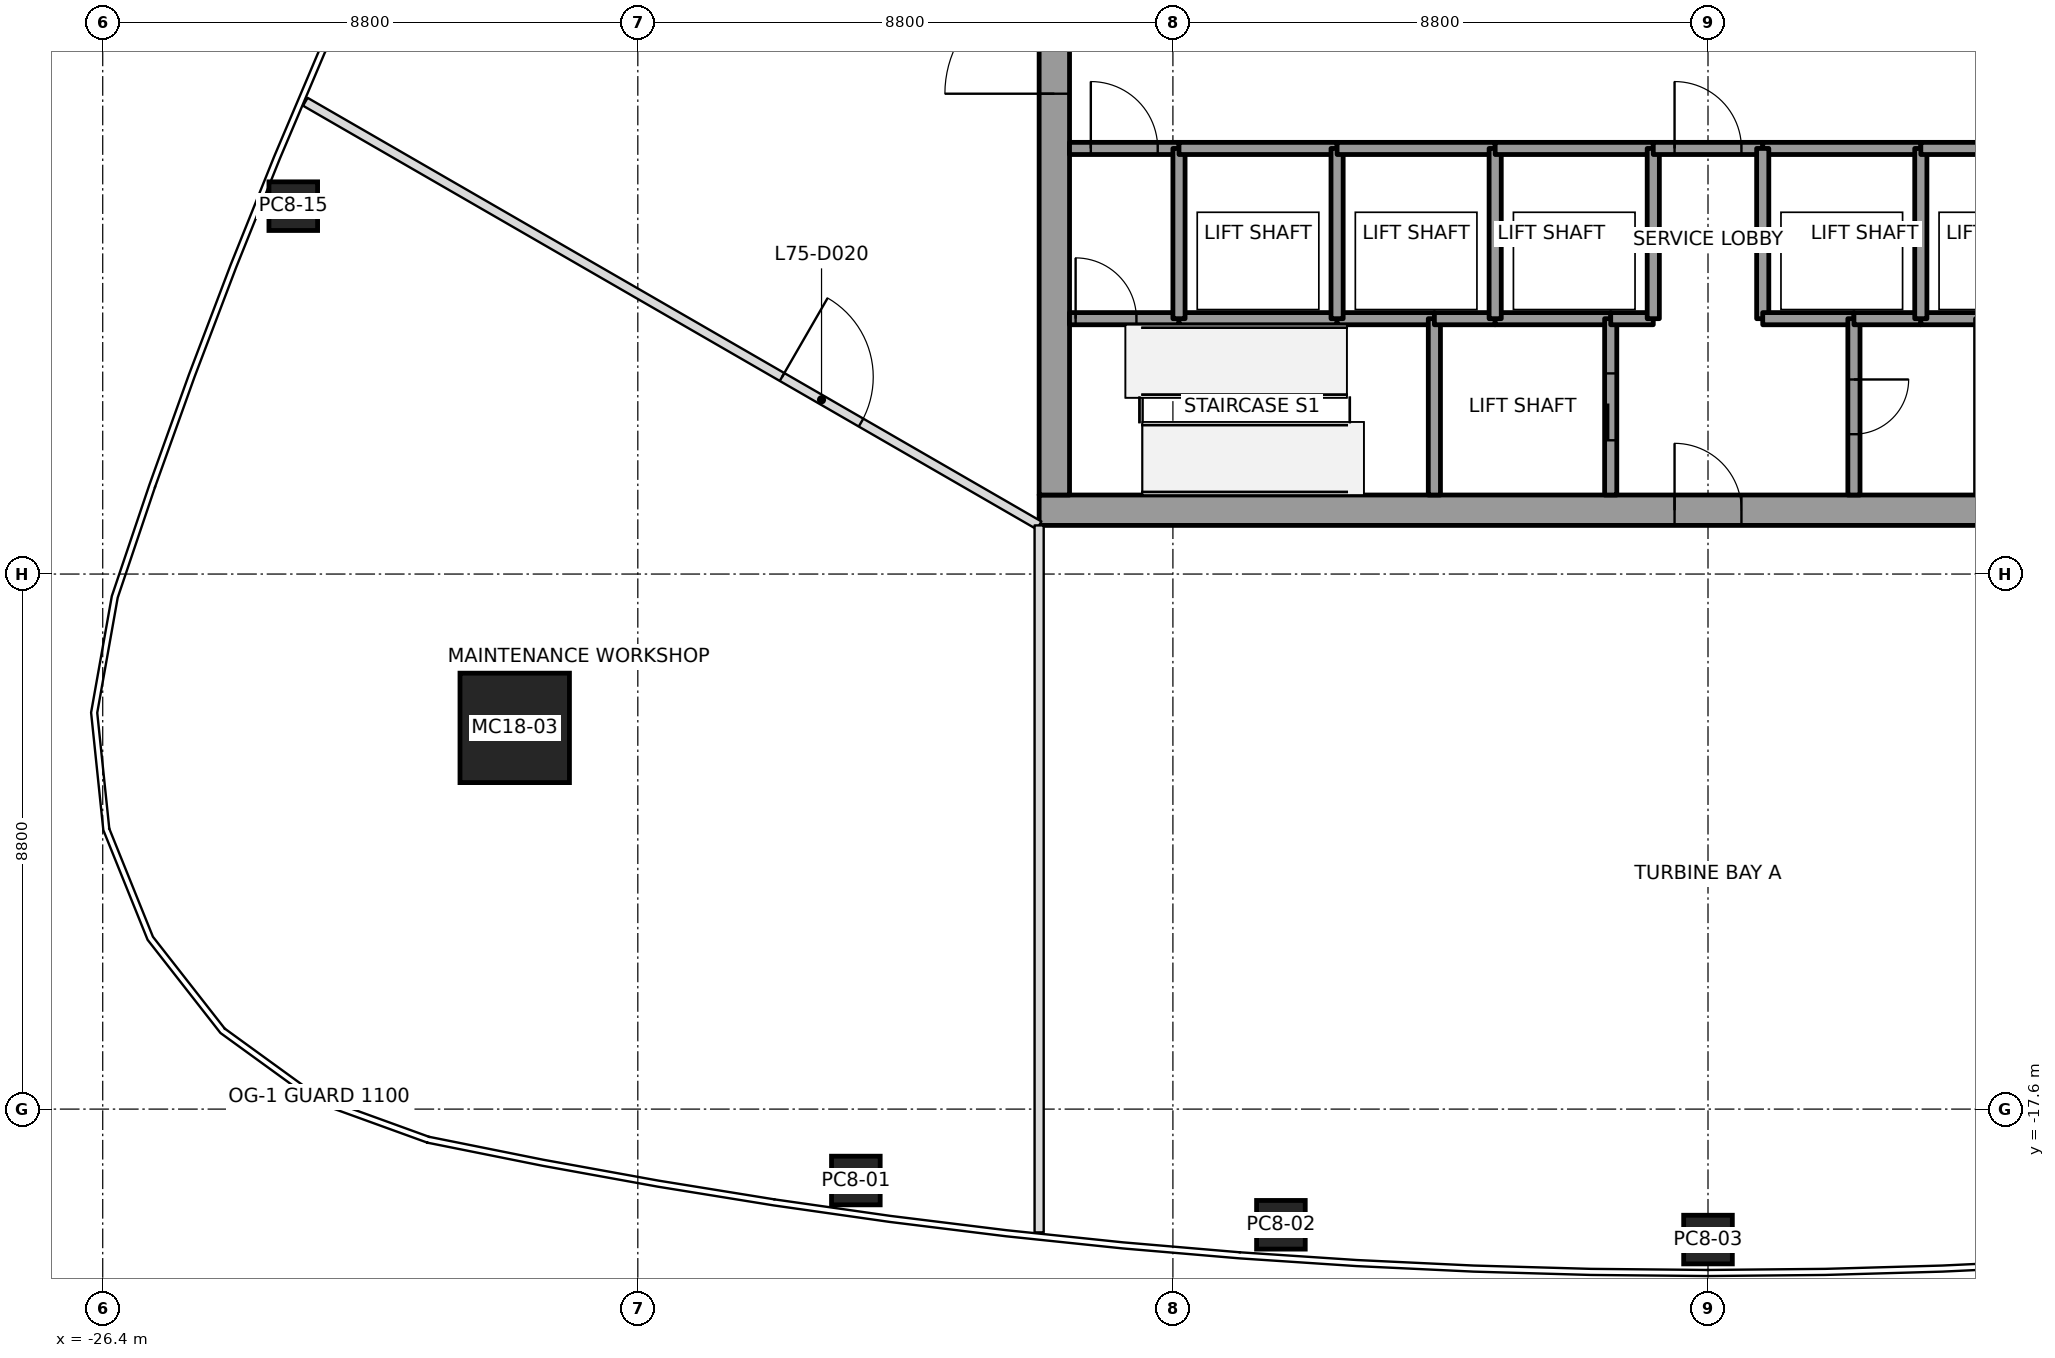
"""IFC4 building model, lengths in metres.
Left out: names, types, materials, properties, quantities, classifications, styles, units other than length and angle.
Written with IfcOpenShell. Run it as: python <this file> out.ifc"""

import sys

from ifc_helpers import new_model, si_unit, direction, frame, frame_2d, origin, origin_2d, place, context, subcontext, project, spatial, rectangle, extrude, clip, halfspace, element, fill, save


model = new_model("IFC4")
c1 = context("Model", 3, precision=1e-05, world=origin(), true_north=direction((0.0, 1.0)))
c2 = subcontext(c1, "Body", "Model", "MODEL_VIEW")
j1 = project(units=[si_unit("LENGTHUNIT", "METRE"), si_unit("PLANEANGLEUNIT", "RADIAN")], contexts=[c1])
p1 = place(None, origin())
s1 = spatial("IfcSite", under=j1, at=p1, CompositionType="ELEMENT")
p2 = place(p1, origin())
s2 = spatial("IfcBuilding", under=s1, at=p2, CompositionType="ELEMENT")
p3 = place(p2, frame((0.0, 0.0, 330.4)))
s3 = spatial("IfcBuildingStorey", under=s2, at=p3, CompositionType="ELEMENT", Elevation=330.4)
p4 = place(p3, frame((-19.625, -11.33, 0.0), z_axis=(0.012314295745, 0.007079363853, 0.999899115275), x_axis=(0.999924176186, -8.7183991e-05, -0.012313987114)))
e1 = element("IfcColumn", 1, at=p4, inside=s3, PredefinedType="COLUMN", context=c2, shape_type="SweptSolid", body=[
    clip(clip(extrude(rectangle(XDim=1.8, YDim=1.8, at=origin_2d()), origin(), (0.0, 0.0, 1.0), 9.001), halfspace(frame((0.0, 0.0, 0.005)), True)), halfspace(frame((0.0, 0.0, 8.992)), False)),
])
p5 = place(p3, frame((-14.014, -18.774, 0.0), z_axis=(0.007730807523, 0.004584233233, 0.999959608895), x_axis=(-0.990410412732, 0.137977794171, 0.007024433605)))
e2 = element("IfcColumn", 2, at=p5, inside=s3, PredefinedType="COLUMN", context=c2, shape_type="SweptSolid", body=[
    clip(clip(extrude(rectangle(XDim=0.8, YDim=0.8, at=origin_2d()), origin(), (0.0, 0.0, 1.0), 9.0), halfspace(frame((0.0, 0.0, 0.002)), True)), halfspace(frame((0.0, 0.0, 8.998)), False)),
])
p6 = place(p3, frame((-7.024, -19.503, 0.0), z_axis=(0.003879046283, 0.004964094195, 0.999980155187), x_axis=(-0.997599573797, 0.069156735942, 0.00352650435)))
e3 = element("IfcColumn", 3, at=p6, inside=s3, PredefinedType="COLUMN", context=c2, shape_type="SweptSolid", body=[
    clip(clip(extrude(rectangle(XDim=0.8, YDim=0.8, at=origin_2d()), origin(), (0.0, 0.0, 1.0), 9.0), halfspace(frame((0.0, 0.0, 0.001)), True)), halfspace(frame((0.0, 0.0, 8.998)), False)),
])
p7 = place(p3, frame((0.0, -19.746, 0.0), z_axis=(0.0, 0.005072634388, 0.999987134107), x_axis=(1.0, 0.0, 0.0)))
e4 = element("IfcColumn", 4, at=p7, inside=s3, PredefinedType="COLUMN", context=c2, shape_type="SweptSolid", body=[
    clip(clip(extrude(rectangle(XDim=0.8, YDim=0.8, at=origin_2d()), origin(), (0.0, 0.0, 1.0), 9.0), halfspace(frame((0.0, 0.0, 0.001)), True)), halfspace(frame((0.0, 0.0, 8.999)), False)),
])
p8 = place(p3, frame((-23.266, -2.75, 0.0), z_axis=(0.00786643411, 0.004394352848, 0.999959403615), x_axis=(0.375745247871, 0.926696342835, -0.007028291271)))
e5 = element("IfcColumn", 5, at=p8, inside=s3, PredefinedType="COLUMN", context=c2, shape_type="SweptSolid", body=[
    clip(clip(extrude(rectangle(XDim=0.8, YDim=0.8, at=origin_2d()), origin(), (0.0, 0.0, 1.0), 9.0), halfspace(frame((0.0, 0.0, 0.002)), True)), halfspace(frame((0.0, 0.0, 8.998)), False)),
])
p9 = place(p3, frame((-11.0, -7.75, 0.0), z_axis=(0.0, 0.0, 1.0), x_axis=(1.0, 0.0, 0.0)))
e6 = element("IfcWall", 6, at=p9, inside=s3, PredefinedType="SHEAR", context=c2, shape_type="SweptSolid", body=[
    extrude(rectangle(XDim=22.0, YDim=0.5, at=frame_2d((11.0, 0.0))), origin(), (0.0, 0.0, 1.0), 9.0),
])
p10 = place(p9, frame((10.45, 0.0, 0.0)))
e7 = element("IfcOpeningElement", 7, at=p10, cuts=e6, PredefinedType="OPENING", context=c2, shape_type="SweptSolid", body=[
    extrude(rectangle(XDim=1.1, YDim=2.1, at=frame_2d((0.55, 1.05))), frame((0.0, 0.25, 0.0), z_axis=(0.0, -1.0, 0.0), x_axis=(1.0, 0.0, 0.0)), (0.0, 0.0, 1.0), 0.5),
])
p11 = place(p3, frame((-10.75, -7.5, 0.0), z_axis=(0.0, 0.0, 1.0), x_axis=(0.0, 1.0, 0.0)))
e8 = element("IfcWall", 8, at=p11, inside=s3, PredefinedType="SHEAR", context=c2, shape_type="SweptSolid", body=[
    extrude(rectangle(XDim=15.0, YDim=0.5, at=frame_2d((7.5, 0.0))), origin(), (0.0, 0.0, 1.0), 9.0),
])
p12 = place(p11, frame((6.6, 0.0, 0.0)))
e9 = element("IfcOpeningElement", 9, at=p12, cuts=e8, PredefinedType="OPENING", context=c2, shape_type="SweptSolid", body=[
    extrude(rectangle(XDim=1.8, YDim=2.1, at=frame_2d((0.9, 1.05))), frame((0.0, 0.25, 0.0), z_axis=(0.0, -1.0, 0.0), x_axis=(1.0, 0.0, 0.0)), (0.0, 0.0, 1.0), 0.5),
])
p13 = place(p3, frame((-10.5, -4.6, 0.0), z_axis=(0.0, 0.0, 1.0), x_axis=(1.0, 0.0, 0.0)))
e10 = element("IfcWall", 10, at=p13, inside=s3, PredefinedType="SOLIDWALL", context=c2, shape_type="SweptSolid", body=[
    extrude(rectangle(XDim=1.8, YDim=0.2, at=frame_2d((0.9, 0.0))), origin(), (0.0, 0.0, 1.0), 8.85),
])
p14 = place(p13, frame((0.1, 0.0, 0.0)))
e11 = element("IfcOpeningElement", 11, at=p14, cuts=e10, PredefinedType="OPENING", context=c2, shape_type="SweptSolid", body=[
    extrude(rectangle(XDim=1.0, YDim=2.1, at=frame_2d((0.5, 1.05))), frame((0.0, 0.1, 0.0), z_axis=(0.0, -1.0, 0.0), x_axis=(1.0, 0.0, 0.0)), (0.0, 0.0, 1.0), 0.2),
])
p15 = place(p3, frame((-10.5, -1.8, 0.0), z_axis=(0.0, 0.0, 1.0), x_axis=(1.0, 0.0, 0.0)))
e12 = element("IfcWall", 12, at=p15, inside=s3, PredefinedType="SOLIDWALL", context=c2, shape_type="SweptSolid", body=[
    extrude(rectangle(XDim=1.8, YDim=0.2, at=frame_2d((0.9, 0.0))), origin(), (0.0, 0.0, 1.0), 8.85),
])
p16 = place(p15, frame((0.35, 0.0, 0.0)))
e13 = element("IfcOpeningElement", 13, at=p16, cuts=e12, PredefinedType="OPENING", context=c2, shape_type="SweptSolid", body=[
    extrude(rectangle(XDim=1.1, YDim=2.1, at=frame_2d((0.55, 1.05))), frame((0.0, 0.1, 0.0), z_axis=(0.0, -1.0, 0.0), x_axis=(1.0, 0.0, 0.0)), (0.0, 0.0, 1.0), 0.2),
])
p17 = place(p3, frame((-8.7, -4.6, 0.0), z_axis=(0.0, 0.0, 1.0), x_axis=(1.0, 0.0, 0.0)))
e14 = element("IfcWall", 14, at=p17, inside=s3, PredefinedType="SOLIDWALL", context=c2, shape_type="SweptSolid", body=[
    extrude(rectangle(XDim=2.6, YDim=0.2, at=frame_2d((1.3, 0.0))), origin(), (0.0, 0.0, 1.0), 8.85),
])
p18 = place(p3, frame((-8.7, -4.6, 0.0), z_axis=(0.0, 0.0, 1.0), x_axis=(0.0, 1.0, 0.0)))
e15 = element("IfcWall", 15, at=p18, inside=s3, PredefinedType="SOLIDWALL", context=c2, shape_type="SweptSolid", body=[
    extrude(rectangle(XDim=2.8, YDim=0.2, at=frame_2d((1.4, 0.0))), origin(), (0.0, 0.0, 1.0), 8.85),
])
p19 = place(p3, frame((-8.7, -1.8, 0.0), z_axis=(0.0, 0.0, 1.0), x_axis=(1.0, 0.0, 0.0)))
e16 = element("IfcWall", 16, at=p19, inside=s3, PredefinedType="SOLIDWALL", context=c2, shape_type="SweptSolid", body=[
    extrude(rectangle(XDim=2.6, YDim=0.2, at=frame_2d((1.3, 0.0))), origin(), (0.0, 0.0, 1.0), 8.85),
])
p20 = place(p3, frame((-6.1, -4.6, 0.0), z_axis=(0.0, 0.0, 1.0), x_axis=(1.0, 0.0, 0.0)))
e17 = element("IfcWall", 17, at=p20, inside=s3, PredefinedType="SOLIDWALL", context=c2, shape_type="SweptSolid", body=[
    extrude(rectangle(XDim=1.6, YDim=0.2, at=frame_2d((0.8, 0.0))), origin(), (0.0, 0.0, 1.0), 8.85),
])
p21 = place(p3, frame((-6.1, -4.6, 0.0), z_axis=(0.0, 0.0, 1.0), x_axis=(0.0, 1.0, 0.0)))
e18 = element("IfcWall", 18, at=p21, inside=s3, PredefinedType="SOLIDWALL", context=c2, shape_type="SweptSolid", body=[
    extrude(rectangle(XDim=2.8, YDim=0.2, at=frame_2d((1.4, 0.0))), origin(), (0.0, 0.0, 1.0), 8.85),
])
p22 = place(p3, frame((-6.1, -1.8, 0.0), z_axis=(0.0, 0.0, 1.0), x_axis=(1.0, 0.0, 0.0)))
e19 = element("IfcWall", 19, at=p22, inside=s3, PredefinedType="SOLIDWALL", context=c2, shape_type="SweptSolid", body=[
    extrude(rectangle(XDim=2.6, YDim=0.2, at=frame_2d((1.3, 0.0))), origin(), (0.0, 0.0, 1.0), 8.85),
])
p23 = place(p3, frame((-4.5, -4.6, 0.0), z_axis=(0.0, 0.0, 1.0), x_axis=(0.0, -1.0, 0.0)))
e20 = element("IfcWall", 20, at=p23, inside=s3, PredefinedType="SOLIDWALL", context=c2, shape_type="SweptSolid", body=[
    extrude(rectangle(XDim=2.9, YDim=0.2, at=frame_2d((1.45, 0.0))), origin(), (0.0, 0.0, 1.0), 8.85),
])
p24 = place(p3, frame((-4.5, -4.6, 0.0), z_axis=(0.0, 0.0, 1.0), x_axis=(1.0, 0.0, 0.0)))
e21 = element("IfcWall", 21, at=p24, inside=s3, PredefinedType="SOLIDWALL", context=c2, shape_type="SweptSolid", body=[
    extrude(rectangle(XDim=1.0, YDim=0.2, at=frame_2d((0.5, 0.0))), origin(), (0.0, 0.0, 1.0), 8.85),
])
p25 = place(p3, frame((-3.5, -4.6, 0.0), z_axis=(0.0, 0.0, 1.0), x_axis=(1.0, 0.0, 0.0)))
e22 = element("IfcWall", 22, at=p25, inside=s3, PredefinedType="SOLIDWALL", context=c2, shape_type="SweptSolid", body=[
    extrude(rectangle(XDim=1.9, YDim=0.2, at=frame_2d((0.95, 0.0))), origin(), (0.0, 0.0, 1.0), 8.85),
])
p26 = place(p3, frame((-3.5, -4.6, 0.0), z_axis=(0.0, 0.0, 1.0), x_axis=(0.0, 1.0, 0.0)))
e23 = element("IfcWall", 23, at=p26, inside=s3, PredefinedType="SOLIDWALL", context=c2, shape_type="SweptSolid", body=[
    extrude(rectangle(XDim=2.8, YDim=0.2, at=frame_2d((1.4, 0.0))), origin(), (0.0, 0.0, 1.0), 8.85),
])
p27 = place(p3, frame((-3.5, -1.8, 0.0), z_axis=(0.0, 0.0, 1.0), x_axis=(1.0, 0.0, 0.0)))
e24 = element("IfcWall", 24, at=p27, inside=s3, PredefinedType="SOLIDWALL", context=c2, shape_type="SweptSolid", body=[
    extrude(rectangle(XDim=2.6, YDim=0.2, at=frame_2d((1.3, 0.0))), origin(), (0.0, 0.0, 1.0), 8.85),
])
p28 = place(p3, frame((-1.6, -7.5, 0.0), z_axis=(0.0, 0.0, 1.0), x_axis=(0.0, 1.0, 0.0)))
e25 = element("IfcWall", 25, at=p28, inside=s3, PredefinedType="SOLIDWALL", context=c2, shape_type="SweptSolid", body=[
    extrude(rectangle(XDim=2.9, YDim=0.2, at=frame_2d((1.45, 0.0))), origin(), (0.0, 0.0, 1.0), 8.85),
])
p29 = place(p28, frame((0.9, 0.0, 0.0)))
e26 = element("IfcOpeningElement", 26, at=p29, cuts=e25, PredefinedType="OPENING", context=c2, shape_type="SweptSolid", body=[
    extrude(rectangle(XDim=1.1, YDim=2.1, at=frame_2d((0.55, 1.05))), frame((0.0, 0.1, 0.0), z_axis=(0.0, -1.0, 0.0), x_axis=(1.0, 0.0, 0.0)), (0.0, 0.0, 1.0), 0.2),
])
p30 = place(p3, frame((-1.6, -4.6, 0.0), z_axis=(0.0, 0.0, 1.0), x_axis=(1.0, 0.0, 0.0)))
e27 = element("IfcWall", 27, at=p30, inside=s3, PredefinedType="SOLIDWALL", context=c2, shape_type="SweptSolid", body=[
    extrude(rectangle(XDim=0.7, YDim=0.2, at=frame_2d((0.35, 0.0))), origin(), (0.0, 0.0, 1.0), 8.85),
])
p31 = place(p3, frame((-0.9, -4.6, 0.0), z_axis=(0.0, 0.0, 1.0), x_axis=(0.0, 1.0, 0.0)))
e28 = element("IfcWall", 28, at=p31, inside=s3, PredefinedType="SOLIDWALL", context=c2, shape_type="SweptSolid", body=[
    extrude(rectangle(XDim=2.8, YDim=0.2, at=frame_2d((1.4, 0.0))), origin(), (0.0, 0.0, 1.0), 8.85),
])
p32 = place(p3, frame((-0.9, -1.8, 0.0), z_axis=(0.0, 0.0, 1.0), x_axis=(1.0, 0.0, 0.0)))
e29 = element("IfcWall", 29, at=p32, inside=s3, PredefinedType="SOLIDWALL", context=c2, shape_type="SweptSolid", body=[
    extrude(rectangle(XDim=1.8, YDim=0.2, at=frame_2d((0.9, 0.0))), origin(), (0.0, 0.0, 1.0), 8.85),
])
p33 = place(p32, frame((0.35, 0.0, 0.0)))
e30 = element("IfcOpeningElement", 30, at=p33, cuts=e29, PredefinedType="OPENING", context=c2, shape_type="SweptSolid", body=[
    extrude(rectangle(XDim=1.1, YDim=2.1, at=frame_2d((0.55, 1.05))), frame((0.0, 0.1, 0.0), z_axis=(0.0, -1.0, 0.0), x_axis=(1.0, 0.0, 0.0)), (0.0, 0.0, 1.0), 0.2),
])
p34 = place(p3, frame((0.9, -1.8, 0.0), z_axis=(0.0, 0.0, 1.0), x_axis=(1.0, 0.0, 0.0)))
e31 = element("IfcWall", 31, at=p34, inside=s3, PredefinedType="SOLIDWALL", context=c2, shape_type="SweptSolid", body=[
    extrude(rectangle(XDim=2.6, YDim=0.2, at=frame_2d((1.3, 0.0))), origin(), (0.0, 0.0, 1.0), 8.85),
])
p35 = place(p3, frame((0.9, -1.8, 0.0), z_axis=(0.0, 0.0, 1.0), x_axis=(0.0, -1.0, 0.0)))
e32 = element("IfcWall", 32, at=p35, inside=s3, PredefinedType="SOLIDWALL", context=c2, shape_type="SweptSolid", body=[
    extrude(rectangle(XDim=2.8, YDim=0.2, at=frame_2d((1.4, 0.0))), origin(), (0.0, 0.0, 1.0), 8.85),
])
p36 = place(p3, frame((0.9, -4.6, 0.0), z_axis=(0.0, 0.0, 1.0), x_axis=(1.0, 0.0, 0.0)))
e33 = element("IfcWall", 33, at=p36, inside=s3, PredefinedType="SOLIDWALL", context=c2, shape_type="SweptSolid", body=[
    extrude(rectangle(XDim=1.5, YDim=0.2, at=frame_2d((0.75, 0.0))), origin(), (0.0, 0.0, 1.0), 8.85),
])
p37 = place(p3, frame((2.4, -4.6, 0.0), z_axis=(0.0, 0.0, 1.0), x_axis=(0.0, -1.0, 0.0)))
e34 = element("IfcWall", 34, at=p37, inside=s3, PredefinedType="SOLIDWALL", context=c2, shape_type="SweptSolid", body=[
    extrude(rectangle(XDim=2.9, YDim=0.2, at=frame_2d((1.45, 0.0))), origin(), (0.0, 0.0, 1.0), 8.85),
])
p38 = place(p37, frame((1.0, 0.0, 0.0)))
e35 = element("IfcOpeningElement", 35, at=p38, cuts=e34, PredefinedType="OPENING", context=c2, shape_type="SweptSolid", body=[
    extrude(rectangle(XDim=0.9, YDim=2.1, at=frame_2d((0.45, 1.05))), frame((0.0, 0.1, 0.0), z_axis=(0.0, -1.0, 0.0), x_axis=(1.0, 0.0, 0.0)), (0.0, 0.0, 1.0), 0.2),
])
p39 = place(p3, frame((3.5, -4.6, 0.0), z_axis=(0.0, 0.0, 1.0), x_axis=(-1.0, 0.0, 0.0)))
e36 = element("IfcWall", 36, at=p39, inside=s3, PredefinedType="SOLIDWALL", context=c2, shape_type="SweptSolid", body=[
    extrude(rectangle(XDim=1.1, YDim=0.2, at=frame_2d((0.55, 0.0))), origin(), (0.0, 0.0, 1.0), 8.85),
])
p40 = place(p3, frame((4.5, -4.6, 0.0), z_axis=(0.0, 0.0, 1.0), x_axis=(-1.0, 0.0, 0.0)))
e37 = element("IfcWall", 37, at=p40, inside=s3, PredefinedType="SOLIDWALL", context=c2, shape_type="SweptSolid", body=[
    extrude(rectangle(XDim=1.0, YDim=0.2, at=frame_2d((0.5, 0.0))), origin(), (0.0, 0.0, 1.0), 8.85),
])
p41 = place(p3, frame((3.5, -4.6, 0.0), z_axis=(0.0, 0.0, 1.0), x_axis=(0.0, 1.0, 0.0)))
e38 = element("IfcWall", 38, at=p41, inside=s3, PredefinedType="SOLIDWALL", context=c2, shape_type="SweptSolid", body=[
    extrude(rectangle(XDim=2.8, YDim=0.2, at=frame_2d((1.4, 0.0))), origin(), (0.0, 0.0, 1.0), 8.85),
])
p42 = place(p3, frame((3.5, -1.8, 0.0), z_axis=(0.0, 0.0, 1.0), x_axis=(1.0, 0.0, 0.0)))
e39 = element("IfcWall", 39, at=p42, inside=s3, PredefinedType="SOLIDWALL", context=c2, shape_type="SweptSolid", body=[
    extrude(rectangle(XDim=2.6, YDim=0.2, at=frame_2d((1.3, 0.0))), origin(), (0.0, 0.0, 1.0), 8.85),
])
p43 = place(p3, frame((-23.068, -1.032, 0.0), z_axis=(0.0, 0.0, 1.0), x_axis=(0.866022206254, -0.500005538244, 0.0)))
e40 = element("IfcWall", 40, at=p43, inside=s3, PredefinedType="PARTITIONING", context=c2, shape_type="SweptSolid", body=[
    extrude(rectangle(XDim=13.935, YDim=0.15, at=frame_2d((6.968, 0.0))), origin(), (0.0, 0.0, 1.0), 8.083),
])
p44 = place(p43, frame((9.053, 0.0, 0.0)))
e41 = element("IfcOpeningElement", 41, at=p44, cuts=e40, PredefinedType="OPENING", context=c2, shape_type="SweptSolid", body=[
    extrude(rectangle(XDim=1.5, YDim=2.1, at=frame_2d((0.75, 1.05))), frame((0.0, 0.075, 0.0), z_axis=(0.0, -1.0, 0.0), x_axis=(1.0, 0.0, 0.0)), (0.0, 0.0, 1.0), 0.15),
])
p45 = place(p3, frame((-11.0, -8.0, 0.0), z_axis=(0.0, 0.0, 1.0), x_axis=(0.0, -1.0, 0.0)))
e42 = element("IfcWall", 42, at=p45, inside=s3, PredefinedType="PARTITIONING", context=c2, shape_type="SweptSolid", body=[
    extrude(rectangle(XDim=11.628, YDim=0.15, at=frame_2d((5.814, 0.0))), origin(), (0.0, 0.0, 1.0), 8.083),
])
p46 = place(p44, origin())
e43 = element("IfcDoor", 43, at=p46, inside=s3, OperationType="DOUBLE_DOOR_SINGLE_SWING", PredefinedType="DOOR", context=c2, shape_type="SweptSolid", body=[
    extrude(rectangle(XDim=1.5, YDim=2.1, at=frame_2d((0.75, 1.05))), frame((0.0, 0.025, 0.0), z_axis=(0.0, -1.0, 0.0), x_axis=(1.0, 0.0, 0.0)), (0.0, 0.0, 1.0), 0.05),
])
fill(e41, e43)
p47 = place(p29, origin())
e44 = element("IfcDoor", 44, at=p47, inside=s3, OperationType="SLIDING_TO_LEFT", PredefinedType="DOOR", context=c2, shape_type="SweptSolid", body=[
    extrude(rectangle(XDim=1.1, YDim=2.1, at=frame_2d((0.55, 1.05))), frame((0.0, 0.025, 0.0), z_axis=(0.0, -1.0, 0.0), x_axis=(1.0, 0.0, 0.0)), (0.0, 0.0, 1.0), 0.05),
])
fill(e26, e44)
p48 = place(p16, origin())
e45 = element("IfcDoor", 45, at=p48, inside=s3, OperationType="SINGLE_SWING_RIGHT", PredefinedType="DOOR", context=c2, shape_type="SweptSolid", body=[
    extrude(rectangle(XDim=1.1, YDim=2.1, at=frame_2d((0.55, 1.05))), frame((0.0, 0.025, 0.0), z_axis=(0.0, -1.0, 0.0), x_axis=(1.0, 0.0, 0.0)), (0.0, 0.0, 1.0), 0.05),
])
fill(e13, e45)
p49 = place(p33, origin())
e46 = element("IfcDoor", 46, at=p49, inside=s3, OperationType="SINGLE_SWING_LEFT", PredefinedType="DOOR", context=c2, shape_type="SweptSolid", body=[
    extrude(rectangle(XDim=1.1, YDim=2.1, at=frame_2d((0.55, 1.05))), frame((0.0, 0.025, 0.0), z_axis=(0.0, -1.0, 0.0), x_axis=(1.0, 0.0, 0.0)), (0.0, 0.0, 1.0), 0.05),
])
fill(e30, e46)
p50 = place(p14, origin())
e47 = element("IfcDoor", 47, at=p50, inside=s3, OperationType="SINGLE_SWING_LEFT", PredefinedType="DOOR", context=c2, shape_type="SweptSolid", body=[
    extrude(rectangle(XDim=1.0, YDim=2.1, at=frame_2d((0.5, 1.05))), frame((0.0, 0.025, 0.0), z_axis=(0.0, -1.0, 0.0), x_axis=(1.0, 0.0, 0.0)), (0.0, 0.0, 1.0), 0.05),
])
fill(e11, e47)
p51 = place(p38, origin())
e48 = element("IfcDoor", 48, at=p51, inside=s3, OperationType="SINGLE_SWING_LEFT", PredefinedType="DOOR", context=c2, shape_type="SweptSolid", body=[
    extrude(rectangle(XDim=0.9, YDim=2.1, at=frame_2d((0.45, 1.05))), frame((0.0, 0.025, 0.0), z_axis=(0.0, -1.0, 0.0), x_axis=(1.0, 0.0, 0.0)), (0.0, 0.0, 1.0), 0.05),
])
fill(e35, e48)
p52 = place(p12, origin())
e49 = element("IfcDoor", 49, at=p52, inside=s3, OperationType="DOUBLE_DOOR_SINGLE_SWING", PredefinedType="DOOR", context=c2, shape_type="SweptSolid", body=[
    extrude(rectangle(XDim=1.8, YDim=2.1, at=frame_2d((0.9, 1.05))), frame((0.0, 0.025, 0.0), z_axis=(0.0, -1.0, 0.0), x_axis=(1.0, 0.0, 0.0)), (0.0, 0.0, 1.0), 0.05),
])
fill(e9, e49)
p53 = place(p10, origin())
e50 = element("IfcDoor", 50, at=p53, inside=s3, OperationType="SINGLE_SWING_RIGHT", PredefinedType="DOOR", context=c2, shape_type="SweptSolid", body=[
    extrude(rectangle(XDim=1.1, YDim=2.1, at=frame_2d((0.55, 1.05))), frame((0.0, 0.025, 0.0), z_axis=(0.0, -1.0, 0.0), x_axis=(1.0, 0.0, 0.0)), (0.0, 0.0, 1.0), 0.05),
])
fill(e7, e50)
save(model, sys.argv[1])
